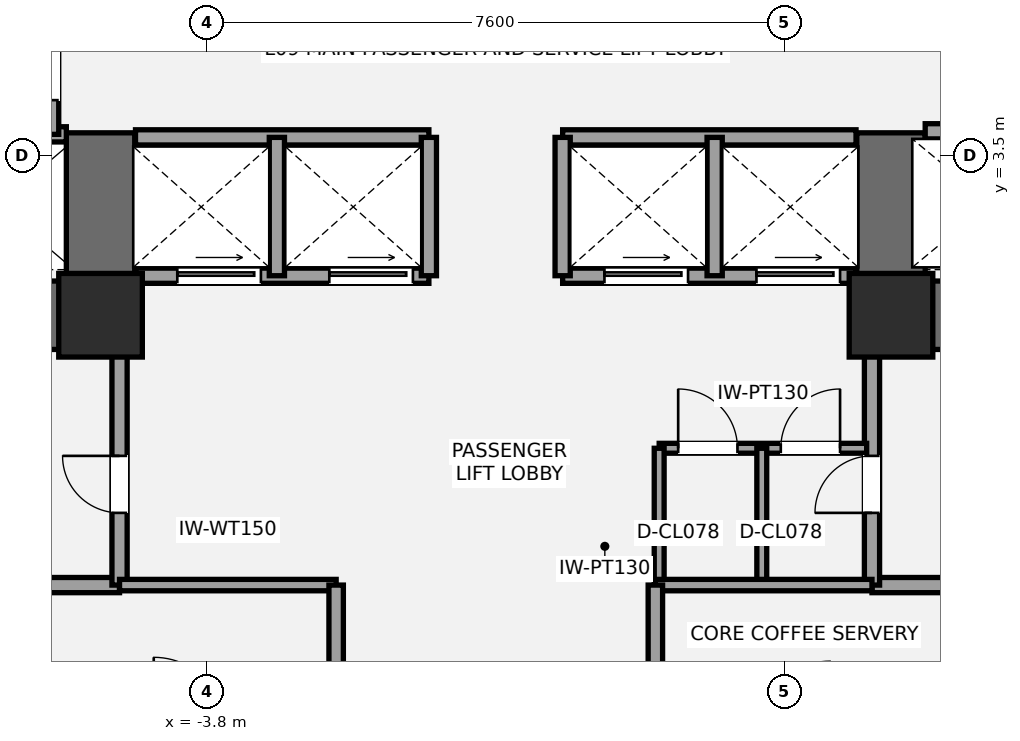
"""IFC4 building model, lengths in metres.
Left out: names, types, materials, properties, quantities, classifications, styles, units other than length and angle.
Written with IfcOpenShell. Run it as: python <this file> out.ifc"""

import sys

from ifc_helpers import new_model, si_unit, direction, frame, frame_2d, origin, origin_2d, place, context, subcontext, project, spatial, rectangle, extrude, element, fill, save


model = new_model("IFC4")
c1 = context("Model", 3, precision=1e-05, world=origin(), true_north=direction((0.0, 1.0)))
c2 = subcontext(c1, "Body", "Model", "MODEL_VIEW")
j1 = project(units=[si_unit("LENGTHUNIT", "METRE"), si_unit("PLANEANGLEUNIT", "RADIAN")], contexts=[c1])
p1 = place(None, origin())
s1 = spatial("IfcSite", under=j1, at=p1, CompositionType="ELEMENT")
p2 = place(p1, origin())
s2 = spatial("IfcBuilding", under=s1, at=p2, CompositionType="ELEMENT")
p3 = place(p2, frame((0.0, 0.0, 37.8)))
s3 = spatial("IfcBuildingStorey", under=s2, at=p3, CompositionType="ELEMENT", Elevation=37.8)
p4 = place(p3, frame((-4.75, 1.4, 0.0), z_axis=(0.0, 0.0, 1.0), x_axis=(-1.0, 0.0, 0.0)))
e1 = element("IfcWall", 1, at=p4, inside=s3, PredefinedType="SHEAR", context=c2, shape_type="SweptSolid", body=[
    extrude(rectangle(XDim=9.3, YDim=0.9, at=frame_2d((4.65, 0.0))), origin(), (0.0, 0.0, 1.0), 3.6),
])
p5 = place(p4, frame((5.55, 0.0, 0.0)))
e2 = element("IfcOpeningElement", 2, at=p5, cuts=e1, PredefinedType="OPENING", context=c2, shape_type="SweptSolid", body=[
    extrude(rectangle(XDim=1.05, YDim=2.15, at=frame_2d((0.525, 1.075))), frame((0.0, 0.46, 0.0), z_axis=(0.0, -1.0, 0.0), x_axis=(1.0, 0.0, 0.0)), (0.0, 0.0, 1.0), 0.92),
])
p6 = place(p4, frame((3.88, 0.0, 0.0)))
e3 = element("IfcOpeningElement", 3, at=p6, cuts=e1, PredefinedType="OPENING", context=c2, shape_type="SweptSolid", body=[
    extrude(rectangle(XDim=1.1, YDim=2.2, at=frame_2d((0.55, 1.1))), frame((0.0, 0.46, 0.0), z_axis=(0.0, -1.0, 0.0), x_axis=(1.0, 0.0, 0.0)), (0.0, 0.0, 1.0), 0.92),
])
p7 = place(p3, frame((-5.2, 0.95, 0.0), z_axis=(0.0, 0.0, 1.0), x_axis=(0.0, 1.0, 0.0)))
e4 = element("IfcWall", 4, at=p7, inside=s3, PredefinedType="SHEAR", context=c2, shape_type="SweptSolid", body=[
    extrude(rectangle(XDim=2.85, YDim=0.9, at=frame_2d((1.425, 0.0))), origin(), (0.0, 0.0, 1.0), 3.6),
])
p8 = place(p3, frame((14.05, 1.4, 0.0), z_axis=(0.0, 0.0, 1.0), x_axis=(-1.0, 0.0, 0.0)))
e5 = element("IfcWall", 5, at=p8, inside=s3, PredefinedType="SHEAR", context=c2, shape_type="SweptSolid", body=[
    extrude(rectangle(XDim=9.3, YDim=0.9, at=frame_2d((4.65, 0.0))), origin(), (0.0, 0.0, 1.0), 3.6),
])
p9 = place(p8, frame((2.7, 0.0, 0.0)))
e6 = element("IfcOpeningElement", 6, at=p9, cuts=e5, PredefinedType="OPENING", context=c2, shape_type="SweptSolid", body=[
    extrude(rectangle(XDim=1.05, YDim=2.15, at=frame_2d((0.525, 1.075))), frame((0.0, 0.46, 0.0), z_axis=(0.0, -1.0, 0.0), x_axis=(1.0, 0.0, 0.0)), (0.0, 0.0, 1.0), 0.92),
])
p10 = place(p8, frame((4.7, 0.0, 0.0)))
e7 = element("IfcOpeningElement", 7, at=p10, cuts=e5, PredefinedType="OPENING", context=c2, shape_type="SweptSolid", body=[
    extrude(rectangle(XDim=1.1, YDim=2.2, at=frame_2d((0.55, 1.1))), frame((0.0, 0.46, 0.0), z_axis=(0.0, -1.0, 0.0), x_axis=(1.0, 0.0, 0.0)), (0.0, 0.0, 1.0), 0.92),
])
p11 = place(p3, frame((5.2, 0.95, 0.0), z_axis=(0.0, 0.0, 1.0), x_axis=(0.0, 1.0, 0.0)))
e8 = element("IfcWall", 8, at=p11, inside=s3, PredefinedType="SHEAR", context=c2, shape_type="SweptSolid", body=[
    extrude(rectangle(XDim=2.85, YDim=0.9, at=frame_2d((1.425, 0.0))), origin(), (0.0, 0.0, 1.0), 3.6),
])
for number, where, z_axis, x_axis in (
    (9, (-5.2, 1.4, 0.0), (0.0, 0.0, 1.0), (1.0, 0.0, 0.0)),
    (10, (5.2, 1.4, 0.0), (0.0, 0.0, 1.0), (1.0, 0.0, 0.0)),
):
    element("IfcColumn", number, at=place(p3, frame(where, z_axis=z_axis, x_axis=x_axis)), inside=s3, PredefinedType="COLUMN", context=c2, shape_type="SweptSolid", body=[
        extrude(rectangle(XDim=1.1, YDim=1.1, at=origin_2d()), origin(), (0.0, 0.0, 1.0), 3.6),
    ])
p12 = place(p3, frame((-7.2, -2.15, 0.0), z_axis=(0.0, 0.0, 1.0), x_axis=(1.0, 0.0, 0.0)))
e11 = element("IfcWall", 11, at=p12, inside=s3, PredefinedType="SOLIDWALL", context=c2, shape_type="SweptSolid", body=[
    extrude(rectangle(XDim=2.25, YDim=0.2, at=frame_2d((1.125, 0.0))), origin(), (0.0, 0.0, 1.0), 3.4),
])
p13 = place(p3, frame((-4.95, -2.15, 0.0), z_axis=(0.0, 0.0, 1.0), x_axis=(0.0, 1.0, 0.0)))
e12 = element("IfcWall", 12, at=p13, inside=s3, PredefinedType="SOLIDWALL", context=c2, shape_type="SweptSolid", body=[
    extrude(rectangle(XDim=3.15, YDim=0.2, at=frame_2d((1.575, 0.0))), origin(), (0.0, 0.0, 1.0), 2.853),
])
p14 = place(p13, frame((0.95, 0.0, 0.0)))
e13 = element("IfcOpeningElement", 13, at=p14, cuts=e12, PredefinedType="OPENING", context=c2, shape_type="SweptSolid", body=[
    extrude(rectangle(XDim=0.75, YDim=2.1, at=frame_2d((0.375, 1.05))), frame((0.0, 0.11, 0.0), z_axis=(0.0, -1.0, 0.0), x_axis=(1.0, 0.0, 0.0)), (0.0, 0.0, 1.0), 0.22),
])
p15 = place(p3, frame((4.95, -2.15, 0.0), z_axis=(0.0, 0.0, 1.0), x_axis=(1.0, 0.0, 0.0)))
e14 = element("IfcWall", 14, at=p15, inside=s3, PredefinedType="SOLIDWALL", context=c2, shape_type="SweptSolid", body=[
    extrude(rectangle(XDim=2.25, YDim=0.2, at=frame_2d((1.125, 0.0))), origin(), (0.0, 0.0, 1.0), 3.4),
])
p16 = place(p3, frame((4.95, -2.15, 0.0), z_axis=(0.0, 0.0, 1.0), x_axis=(0.0, 1.0, 0.0)))
e15 = element("IfcWall", 15, at=p16, inside=s3, PredefinedType="SOLIDWALL", context=c2, shape_type="SweptSolid", body=[
    extrude(rectangle(XDim=3.15, YDim=0.2, at=frame_2d((1.575, 0.0))), origin(), (0.0, 0.0, 1.0), 3.4),
])
p17 = place(p16, frame((0.95, 0.0, 0.0)))
e16 = element("IfcOpeningElement", 16, at=p17, cuts=e15, PredefinedType="OPENING", context=c2, shape_type="SweptSolid", body=[
    extrude(rectangle(XDim=0.75, YDim=2.1, at=frame_2d((0.375, 1.05))), frame((0.0, 0.11, 0.0), z_axis=(0.0, -1.0, 0.0), x_axis=(1.0, 0.0, 0.0)), (0.0, 0.0, 1.0), 0.22),
])
p18 = place(p3, frame((2.15, -0.35, 0.0), z_axis=(0.0, 0.0, 1.0), x_axis=(1.0, 0.0, 0.0)))
e17 = element("IfcWall", 17, at=p18, inside=s3, PredefinedType="PARTITIONING", context=c2, shape_type="SweptSolid", body=[
    extrude(rectangle(XDim=2.73, YDim=0.13, at=frame_2d((1.365, 0.0))), origin(), (0.0, 0.0, 1.0), 3.4),
])
p19 = place(p18, frame((0.25, 0.0, 0.0)))
e18 = element("IfcOpeningElement", 18, at=p19, cuts=e17, PredefinedType="OPENING", context=c2, shape_type="SweptSolid", body=[
    extrude(rectangle(XDim=0.78, YDim=2.1, at=frame_2d((0.39, 1.05))), frame((0.0, 0.075, 0.0), z_axis=(0.0, -1.0, 0.0), x_axis=(1.0, 0.0, 0.0)), (0.0, 0.0, 1.0), 0.15),
])
p20 = place(p18, frame((1.6, 0.0, 0.0)))
e19 = element("IfcOpeningElement", 19, at=p20, cuts=e17, PredefinedType="OPENING", context=c2, shape_type="SweptSolid", body=[
    extrude(rectangle(XDim=0.78, YDim=2.1, at=frame_2d((0.39, 1.05))), frame((0.0, 0.075, 0.0), z_axis=(0.0, -1.0, 0.0), x_axis=(1.0, 0.0, 0.0)), (0.0, 0.0, 1.0), 0.15),
])
for number, where, z_axis, x_axis in (
    (20, (2.15, -2.15, 0.0), (0.0, 0.0, 1.0), (0.0, 1.0, 0.0)),
    (21, (3.5, -2.15, 0.0), (0.0, 0.0, 1.0), (0.0, 1.0, 0.0)),
):
    element("IfcWall", number, at=place(p3, frame(where, z_axis=z_axis, x_axis=x_axis)), inside=s3, PredefinedType="PARTITIONING", context=c2, shape_type="SweptSolid", body=[
        extrude(rectangle(XDim=1.8, YDim=0.13, at=frame_2d((0.9, 0.0))), origin(), (0.0, 0.0, 1.0), 3.4),
    ])
p21 = place(p3, frame((-9.78, 3.78, 0.0), z_axis=(0.0, 0.0, 1.0), x_axis=(1.0, 0.0, 0.0)))
e22 = element("IfcWall", 22, at=p21, inside=s3, PredefinedType="SOLIDWALL", context=c2, shape_type="SweptSolid", body=[
    extrude(rectangle(XDim=4.13, YDim=0.2, at=frame_2d((2.065, 0.0))), origin(), (0.0, 0.0, 1.0), 3.4),
])
p22 = place(p3, frame((-5.85, 3.78, 0.0), z_axis=(0.0, 0.0, 1.0), x_axis=(0.0, 1.0, 0.0)))
e23 = element("IfcWall", 23, at=p22, inside=s3, PredefinedType="SOLIDWALL", context=c2, shape_type="SweptSolid", body=[
    extrude(rectangle(XDim=1.69, YDim=0.2, at=frame_2d((0.845, 0.0))), origin(), (0.0, 0.0, 1.0), 3.4),
])
p23 = place(p22, frame((0.45, 0.0, 0.0)))
e24 = element("IfcOpeningElement", 24, at=p23, cuts=e23, PredefinedType="OPENING", context=c2, shape_type="SweptSolid", body=[
    extrude(rectangle(XDim=0.75, YDim=2.1, at=frame_2d((0.375, 1.05))), frame((0.0, 0.11, 0.0), z_axis=(0.0, -1.0, 0.0), x_axis=(1.0, 0.0, 0.0)), (0.0, 0.0, 1.0), 0.22),
])
p24 = place(p3, frame((5.65, 3.82, 0.0), z_axis=(0.0, 0.0, 1.0), x_axis=(1.0, 0.0, 0.0)))
e25 = element("IfcWall", 25, at=p24, inside=s3, PredefinedType="SOLIDWALL", context=c2, shape_type="SweptSolid", body=[
    extrude(rectangle(XDim=4.13, YDim=0.2, at=frame_2d((2.065, 0.0))), origin(), (0.0, 0.0, 1.0), 3.4),
])
p25 = place(p24, frame((0.65, 0.0, 0.0)))
e26 = element("IfcOpeningElement", 26, at=p25, cuts=e25, PredefinedType="OPENING", context=c2, shape_type="SweptSolid", body=[
    extrude(rectangle(XDim=1.2, YDim=2.2, at=frame_2d((0.6, 1.1))), frame((0.0, 0.11, 0.0), z_axis=(0.0, -1.0, 0.0), x_axis=(1.0, 0.0, 0.0)), (0.0, 0.0, 1.0), 0.22),
])
p26 = place(p3, frame((-4.74, 1.92, 0.0), z_axis=(0.0, 0.0, 1.0), x_axis=(1.0, 0.0, 0.0)))
e27 = element("IfcWall", 27, at=p26, inside=s3, PredefinedType="SOLIDWALL", context=c2, shape_type="SweptSolid", body=[
    extrude(rectangle(XDim=3.86, YDim=0.2, at=frame_2d((1.93, 0.0))), origin(), (0.0, 0.0, 1.0), 2.39),
])
p27 = place(p26, frame((0.55, 0.0, 0.0)))
e28 = element("IfcOpeningElement", 28, at=p27, cuts=e27, PredefinedType="OPENING", context=c2, shape_type="SweptSolid", body=[
    extrude(rectangle(XDim=1.1, YDim=2.2, at=frame_2d((0.55, 1.1))), frame((0.0, 0.11, 0.0), z_axis=(0.0, -1.0, 0.0), x_axis=(1.0, 0.0, 0.0)), (0.0, 0.0, 1.0), 0.22),
])
p28 = place(p26, frame((2.55, 0.0, 0.0)))
e29 = element("IfcOpeningElement", 29, at=p28, cuts=e27, PredefinedType="OPENING", context=c2, shape_type="SweptSolid", body=[
    extrude(rectangle(XDim=1.1, YDim=2.2, at=frame_2d((0.55, 1.1))), frame((0.0, 0.11, 0.0), z_axis=(0.0, -1.0, 0.0), x_axis=(1.0, 0.0, 0.0)), (0.0, 0.0, 1.0), 0.22),
])
p29 = place(p3, frame((0.88, 1.92, 0.0), z_axis=(0.0, 0.0, 1.0), x_axis=(1.0, 0.0, 0.0)))
e30 = element("IfcWall", 30, at=p29, inside=s3, PredefinedType="SOLIDWALL", context=c2, shape_type="SweptSolid", body=[
    extrude(rectangle(XDim=3.86, YDim=0.2, at=frame_2d((1.93, 0.0))), origin(), (0.0, 0.0, 1.0), 2.39),
])
p30 = place(p29, frame((0.55, 0.0, 0.0)))
e31 = element("IfcOpeningElement", 31, at=p30, cuts=e30, PredefinedType="OPENING", context=c2, shape_type="SweptSolid", body=[
    extrude(rectangle(XDim=1.1, YDim=2.2, at=frame_2d((0.55, 1.1))), frame((0.0, 0.11, 0.0), z_axis=(0.0, -1.0, 0.0), x_axis=(1.0, 0.0, 0.0)), (0.0, 0.0, 1.0), 0.22),
])
p31 = place(p29, frame((2.55, 0.0, 0.0)))
e32 = element("IfcOpeningElement", 32, at=p31, cuts=e30, PredefinedType="OPENING", context=c2, shape_type="SweptSolid", body=[
    extrude(rectangle(XDim=1.1, YDim=2.2, at=frame_2d((0.55, 1.1))), frame((0.0, 0.11, 0.0), z_axis=(0.0, -1.0, 0.0), x_axis=(1.0, 0.0, 0.0)), (0.0, 0.0, 1.0), 0.22),
])
for number, where, z_axis, x_axis in (
    (33, (-4.74, 3.74, 0.0), (0.0, 0.0, 1.0), (1.0, 0.0, 0.0)),
    (34, (0.88, 3.74, 0.0), (0.0, 0.0, 1.0), (1.0, 0.0, 0.0)),
):
    element("IfcWall", number, at=place(p3, frame(where, z_axis=z_axis, x_axis=x_axis)), inside=s3, PredefinedType="SOLIDWALL", context=c2, shape_type="SweptSolid", body=[
        extrude(rectangle(XDim=3.86, YDim=0.2, at=frame_2d((1.93, 0.0))), origin(), (0.0, 0.0, 1.0), 3.4),
    ])
for number, where, z_axis, x_axis in (
    (35, (-2.88, 1.92, 0.0), (0.0, 0.0, 1.0), (0.0, 1.0, 0.0)),
    (36, (2.88, 1.92, 0.0), (0.0, 0.0, 1.0), (0.0, 1.0, 0.0)),
    (37, (-0.88, 1.92, 0.0), (0.0, 0.0, 1.0), (0.0, 1.0, 0.0)),
    (38, (0.88, 1.92, 0.0), (0.0, 0.0, 1.0), (0.0, 1.0, 0.0)),
):
    element("IfcWall", number, at=place(p3, frame(where, z_axis=z_axis, x_axis=x_axis)), inside=s3, PredefinedType="SOLIDWALL", context=c2, shape_type="SweptSolid", body=[
        extrude(rectangle(XDim=1.82, YDim=0.2, at=frame_2d((0.91, 0.0))), origin(), (0.0, 0.0, 1.0), 3.4),
    ])
p32 = place(p3, frame((-4.95, -2.15, 0.0), z_axis=(0.0, 0.0, 1.0), x_axis=(1.0, 0.0, 0.0)))
e39 = element("IfcWall", 39, at=p32, inside=s3, PredefinedType="PLUMBINGWALL", context=c2, shape_type="SweptSolid", body=[
    extrude(rectangle(XDim=2.85, YDim=0.15, at=frame_2d((1.425, 0.0))), origin(), (0.0, 0.0, 1.0), 2.853),
])
p33 = place(p3, frame((-2.1, -4.05, 0.0), z_axis=(0.0, 0.0, 1.0), x_axis=(0.0, 1.0, 0.0)))
e40 = element("IfcWall", 40, at=p33, inside=s3, PredefinedType="PLUMBINGWALL", context=c2, shape_type="SweptSolid", body=[
    extrude(rectangle(XDim=1.9, YDim=0.19, at=frame_2d((0.95, 0.0))), origin(), (0.0, 0.0, 1.0), 3.4),
])
p34 = place(p3, frame((2.1, -2.15, 0.0), z_axis=(0.0, 0.0, 1.0), x_axis=(1.0, 0.0, 0.0)))
e41 = element("IfcWall", 41, at=p34, inside=s3, PredefinedType="PLUMBINGWALL", context=c2, shape_type="SweptSolid", body=[
    extrude(rectangle(XDim=2.85, YDim=0.15, at=frame_2d((1.425, 0.0))), origin(), (0.0, 0.0, 1.0), 3.4),
])
p35 = place(p3, frame((2.1, -4.05, 0.0), z_axis=(0.0, 0.0, 1.0), x_axis=(0.0, 1.0, 0.0)))
e42 = element("IfcWall", 42, at=p35, inside=s3, PredefinedType="PLUMBINGWALL", context=c2, shape_type="SweptSolid", body=[
    extrude(rectangle(XDim=1.9, YDim=0.19, at=frame_2d((0.95, 0.0))), origin(), (0.0, 0.0, 1.0), 3.4),
])
p36 = place(p14, origin())
e43 = element("IfcDoor", 43, at=p36, inside=s3, OperationType="SINGLE_SWING_RIGHT", PredefinedType="DOOR", context=c2, shape_type="SweptSolid", body=[
    extrude(rectangle(XDim=0.75, YDim=2.1, at=frame_2d((0.375, 1.05))), frame((0.0, 0.025, 0.0), z_axis=(0.0, -1.0, 0.0), x_axis=(1.0, 0.0, 0.0)), (0.0, 0.0, 1.0), 0.05),
])
fill(e13, e43)
p37 = place(p17, origin())
e44 = element("IfcDoor", 44, at=p37, inside=s3, OperationType="SINGLE_SWING_LEFT", PredefinedType="DOOR", context=c2, shape_type="SweptSolid", body=[
    extrude(rectangle(XDim=0.75, YDim=2.1, at=frame_2d((0.375, 1.05))), frame((0.0, 0.025, 0.0), z_axis=(0.0, -1.0, 0.0), x_axis=(1.0, 0.0, 0.0)), (0.0, 0.0, 1.0), 0.05),
])
fill(e16, e44)
p38 = place(p19, origin())
e45 = element("IfcDoor", 45, at=p38, inside=s3, OperationType="SINGLE_SWING_LEFT", PredefinedType="DOOR", context=c2, shape_type="SweptSolid", body=[
    extrude(rectangle(XDim=0.78, YDim=2.1, at=frame_2d((0.39, 1.05))), frame((0.0, 0.025, 0.0), z_axis=(0.0, -1.0, 0.0), x_axis=(1.0, 0.0, 0.0)), (0.0, 0.0, 1.0), 0.05),
])
fill(e18, e45)
p39 = place(p20, origin())
e46 = element("IfcDoor", 46, at=p39, inside=s3, OperationType="SINGLE_SWING_RIGHT", PredefinedType="DOOR", context=c2, shape_type="SweptSolid", body=[
    extrude(rectangle(XDim=0.78, YDim=2.1, at=frame_2d((0.39, 1.05))), frame((0.0, 0.025, 0.0), z_axis=(0.0, -1.0, 0.0), x_axis=(1.0, 0.0, 0.0)), (0.0, 0.0, 1.0), 0.05),
])
fill(e19, e46)
p40 = place(p23, origin())
e47 = element("IfcDoor", 47, at=p40, inside=s3, OperationType="SINGLE_SWING_RIGHT", PredefinedType="DOOR", context=c2, shape_type="SweptSolid", body=[
    extrude(rectangle(XDim=0.75, YDim=2.1, at=frame_2d((0.375, 1.05))), frame((0.0, 0.025, 0.0), z_axis=(0.0, -1.0, 0.0), x_axis=(1.0, 0.0, 0.0)), (0.0, 0.0, 1.0), 0.05),
])
fill(e24, e47)
p41 = place(p27, origin())
e48 = element("IfcDoor", 48, at=p41, inside=s3, OperationType="SLIDING_TO_LEFT", PredefinedType="DOOR", context=c2, shape_type="SweptSolid", body=[
    extrude(rectangle(XDim=1.1, YDim=2.2, at=frame_2d((0.55, 1.1))), frame((0.0, 0.025, 0.0), z_axis=(0.0, -1.0, 0.0), x_axis=(1.0, 0.0, 0.0)), (0.0, 0.0, 1.0), 0.05),
])
fill(e28, e48)
p42 = place(p28, origin())
e49 = element("IfcDoor", 49, at=p42, inside=s3, OperationType="SLIDING_TO_LEFT", PredefinedType="DOOR", context=c2, shape_type="SweptSolid", body=[
    extrude(rectangle(XDim=1.1, YDim=2.2, at=frame_2d((0.55, 1.1))), frame((0.0, 0.025, 0.0), z_axis=(0.0, -1.0, 0.0), x_axis=(1.0, 0.0, 0.0)), (0.0, 0.0, 1.0), 0.05),
])
fill(e29, e49)
p43 = place(p30, origin())
e50 = element("IfcDoor", 50, at=p43, inside=s3, OperationType="SLIDING_TO_LEFT", PredefinedType="DOOR", context=c2, shape_type="SweptSolid", body=[
    extrude(rectangle(XDim=1.1, YDim=2.2, at=frame_2d((0.55, 1.1))), frame((0.0, 0.025, 0.0), z_axis=(0.0, -1.0, 0.0), x_axis=(1.0, 0.0, 0.0)), (0.0, 0.0, 1.0), 0.05),
])
fill(e31, e50)
p44 = place(p31, origin())
e51 = element("IfcDoor", 51, at=p44, inside=s3, OperationType="SLIDING_TO_LEFT", PredefinedType="DOOR", context=c2, shape_type="SweptSolid", body=[
    extrude(rectangle(XDim=1.1, YDim=2.2, at=frame_2d((0.55, 1.1))), frame((0.0, 0.025, 0.0), z_axis=(0.0, -1.0, 0.0), x_axis=(1.0, 0.0, 0.0)), (0.0, 0.0, 1.0), 0.05),
])
fill(e32, e51)
save(model, sys.argv[1])
